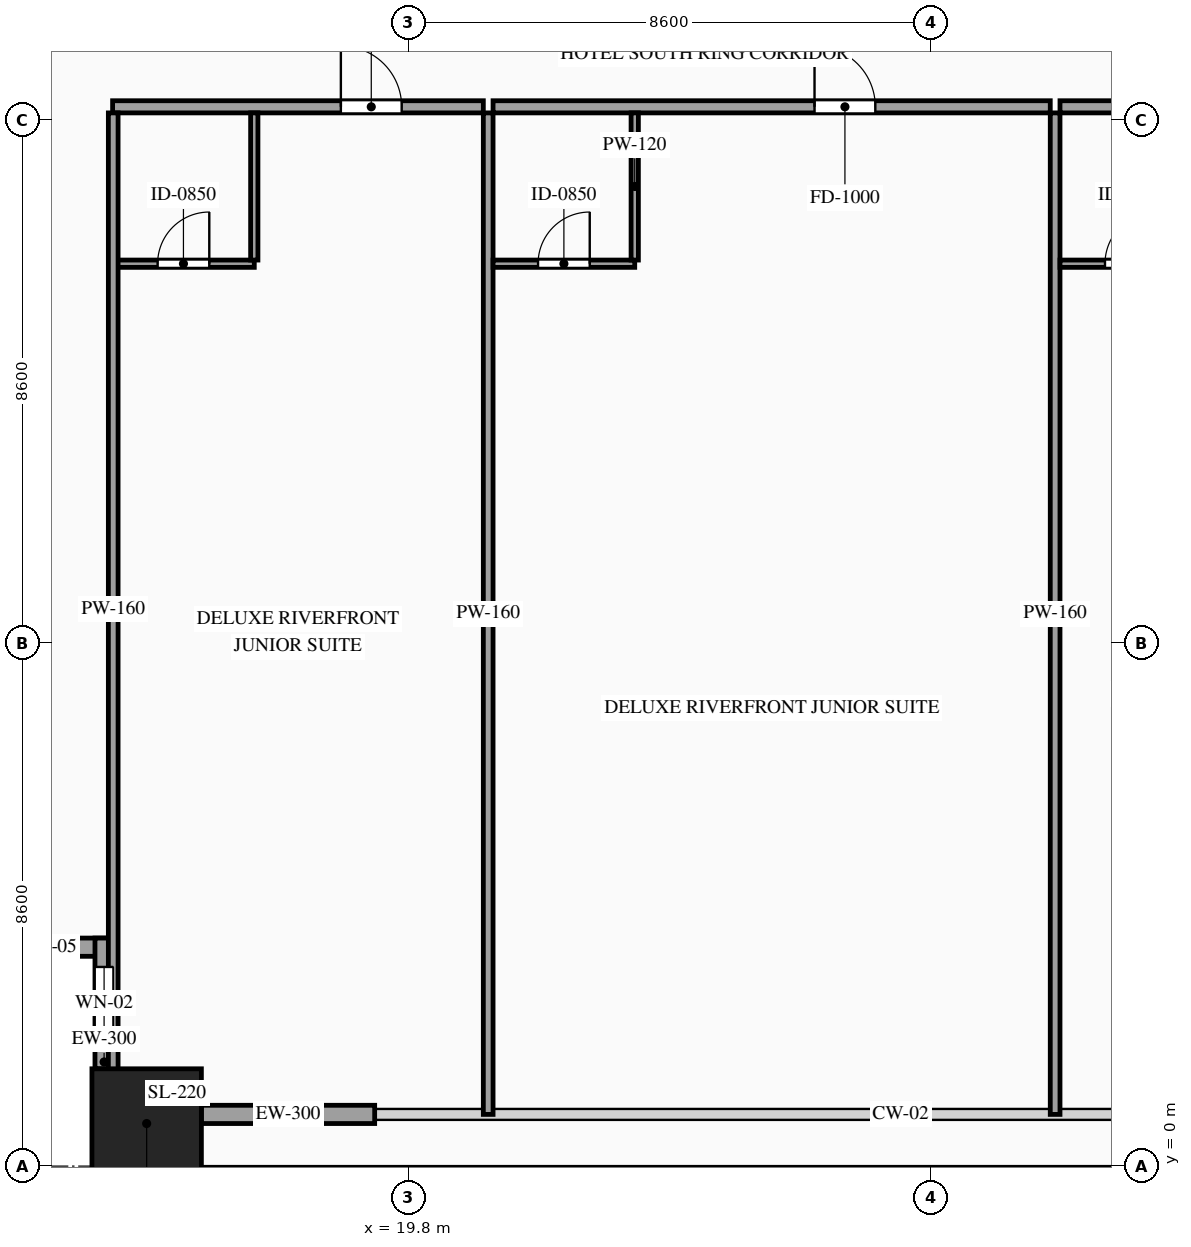
"""IFC4 building model, lengths in metres.
Left out: names, types, materials, properties, quantities, classifications, styles, units other than length and angle.
Written with IfcOpenShell. Run it as: python <this file> out.ifc"""

import sys

from ifc_helpers import new_model, si_unit, direction, frame, frame_2d, origin, origin_2d, place, context, subcontext, project, spatial, rectangle, hollow_rectangle, extrude, source, transform, mapped, element, fill, save


model = new_model("IFC4")
c1 = context("Model", 3, precision=1e-05, world=origin(), true_north=direction((0.0, 1.0)))
c2 = subcontext(c1, "Body", "Model", "MODEL_VIEW")
j1 = project(units=[si_unit("LENGTHUNIT", "METRE"), si_unit("PLANEANGLEUNIT", "RADIAN")], contexts=[c1])
p1 = place(None, origin())
s1 = spatial("IfcSite", under=j1, at=p1, CompositionType="ELEMENT")
p2 = place(p1, origin())
s2 = spatial("IfcBuilding", under=s1, at=p2, CompositionType="ELEMENT")
p3 = place(p2, frame((0.0, 0.0, 64.0)))
s3 = spatial("IfcBuildingStorey", under=s2, at=p3, CompositionType="ELEMENT", Elevation=64.0)
m1 = source(origin(), c2, "Body", "SweptSolid", [
    extrude(hollow_rectangle(XDim=1.8, YDim=1.8, WallThickness=0.08, at=origin_2d()), origin(), (0.0, 0.0, 1.0), 3.6),
])
p4 = place(p3, frame((15.5, 0.7, 0.0), z_axis=(0.0, 0.0, 1.0), x_axis=(1.0, 0.0, 0.0)))
e1 = element("IfcColumn", 1, at=p4, inside=s3, PredefinedType="COLUMN", context=c2, shape_type="MappedRepresentation", body=[
    mapped(m1, transform((0.0, 0.0, 0.0), scale=1.0)),
])
p5 = place(p3, frame((12.8, 3.6, 0.0), z_axis=(0.0, 0.0, 1.0), x_axis=(1.0, 0.0, 0.0)))
e2 = element("IfcWall", 2, at=p5, inside=s3, PredefinedType="SOLIDWALL", context=c2, shape_type="SweptSolid", body=[
    extrude(rectangle(XDim=2.15, YDim=0.3, at=frame_2d((1.075, 0.0))), origin(), (0.0, 0.0, 1.0), 3.38),
])
p6 = place(p5, frame((0.625, 0.0, 0.85)))
e3 = element("IfcOpeningElement", 3, at=p6, cuts=e2, PredefinedType="OPENING", context=c2, shape_type="SweptSolid", body=[
    extrude(rectangle(XDim=0.9, YDim=1.5, at=frame_2d((0.45, 0.75))), frame((0.0, 0.165, 0.0), z_axis=(0.0, -1.0, 0.0), x_axis=(1.0, 0.0, 0.0)), (0.0, 0.0, 1.0), 0.33),
])
p7 = place(p3, frame((14.8, 3.75, 0.0), z_axis=(0.0, 0.0, 1.0), x_axis=(0.0, -1.0, 0.0)))
e4 = element("IfcWall", 4, at=p7, inside=s3, PredefinedType="SOLIDWALL", context=c2, shape_type="SweptSolid", body=[
    extrude(rectangle(XDim=2.15, YDim=0.3, at=frame_2d((1.075, 0.0))), origin(), (0.0, 0.0, 1.0), 3.38),
])
p8 = place(p7, frame((0.475, 0.0, 0.85)))
e5 = element("IfcOpeningElement", 5, at=p8, cuts=e4, PredefinedType="OPENING", context=c2, shape_type="SweptSolid", body=[
    extrude(rectangle(XDim=1.2, YDim=2.1, at=frame_2d((0.6, 1.05))), frame((0.0, 0.165, 0.0), z_axis=(0.0, -1.0, 0.0), x_axis=(1.0, 0.0, 0.0)), (0.0, 0.0, 1.0), 0.33),
])
m2 = source(origin(), c2, "Body", "SweptSolid", [
    extrude(rectangle(XDim=2.85, YDim=0.3, at=frame_2d((1.425, 0.0))), origin(), (0.0, 0.0, 1.0), 2.775),
])
p9 = place(p3, frame((16.4, 0.85, 0.0), z_axis=(0.0, 0.0, 1.0), x_axis=(1.0, 0.0, 0.0)))
e6 = element("IfcWall", 6, at=p9, inside=s3, PredefinedType="SOLIDWALL", context=c2, shape_type="MappedRepresentation", body=[
    mapped(m2, transform((0.0, 0.0, 0.0), scale=1.0)),
])
p10 = place(p3, frame((14.94, 17.42, 0.0), z_axis=(0.0, 0.0, 1.0), x_axis=(1.0, 0.0, 0.0)))
e7 = element("IfcWall", 7, at=p10, inside=s3, PredefinedType="PARTITIONING", context=c2, shape_type="SweptSolid", body=[
    extrude(rectangle(XDim=6.097, YDim=0.2, at=frame_2d((3.049, 0.0))), origin(), (0.0, 0.0, 1.0), 3.38),
])
p11 = place(p10, frame((3.754, 0.0, 0.0)))
e8 = element("IfcOpeningElement", 8, at=p11, cuts=e7, PredefinedType="OPENING", context=c2, shape_type="SweptSolid", body=[
    extrude(rectangle(XDim=1.0, YDim=2.2, at=frame_2d((0.5, 1.1))), frame((0.0, 0.115, 0.0), z_axis=(0.0, -1.0, 0.0), x_axis=(1.0, 0.0, 0.0)), (0.0, 0.0, 1.0), 0.23),
])
m3 = source(origin(), c2, "Body", "SweptSolid", [
    extrude(rectangle(XDim=16.47, YDim=0.16, at=frame_2d((8.235, 0.0))), origin(), (0.0, 0.0, 1.0), 3.38),
])
p12 = place(p3, frame((21.117, 0.85, 0.0), z_axis=(0.0, 0.0, 1.0), x_axis=(0.0, 1.0, 0.0)))
e9 = element("IfcWall", 9, at=p12, inside=s3, PredefinedType="PARTITIONING", context=c2, shape_type="MappedRepresentation", body=[
    mapped(m3, transform((0.0, 0.0, 0.0), scale=1.0)),
])
p13 = place(p3, frame((14.94, 14.84, 0.0), z_axis=(0.0, 0.0, 1.0), x_axis=(1.0, 0.0, 0.0)))
e10 = element("IfcWall", 10, at=p13, inside=s3, PredefinedType="PARTITIONING", context=c2, shape_type="SweptSolid", body=[
    extrude(rectangle(XDim=2.33, YDim=0.12, at=frame_2d((1.165, 0.0))), origin(), (0.0, 0.0, 1.0), 3.38),
])
p14 = place(p13, frame((0.74, 0.0, 0.0)))
e11 = element("IfcOpeningElement", 11, at=p14, cuts=e10, PredefinedType="OPENING", context=c2, shape_type="SweptSolid", body=[
    extrude(rectangle(XDim=0.85, YDim=2.1, at=frame_2d((0.425, 1.05))), frame((0.0, 0.075, 0.0), z_axis=(0.0, -1.0, 0.0), x_axis=(1.0, 0.0, 0.0)), (0.0, 0.0, 1.0), 0.15),
])
m4 = source(origin(), c2, "Body", "SweptSolid", [
    extrude(rectangle(XDim=2.42, YDim=0.12, at=frame_2d((1.21, 0.0))), origin(), (0.0, 0.0, 1.0), 3.38),
])
p15 = place(p3, frame((17.27, 14.9, 0.0), z_axis=(0.0, 0.0, 1.0), x_axis=(0.0, 1.0, 0.0)))
e12 = element("IfcWall", 12, at=p15, inside=s3, PredefinedType="PARTITIONING", context=c2, shape_type="MappedRepresentation", body=[
    mapped(m4, transform((0.0, 0.0, 0.0), scale=1.0)),
])
p16 = place(p3, frame((21.197, 17.42, 0.0), z_axis=(0.0, 0.0, 1.0), x_axis=(1.0, 0.0, 0.0)))
e13 = element("IfcWall", 13, at=p16, inside=s3, PredefinedType="PARTITIONING", context=c2, shape_type="SweptSolid", body=[
    extrude(rectangle(XDim=9.164, YDim=0.2, at=frame_2d((4.582, 0.0))), origin(), (0.0, 0.0, 1.0), 3.38),
])
p17 = place(p16, frame((5.287, 0.0, 0.0)))
e14 = element("IfcOpeningElement", 14, at=p17, cuts=e13, PredefinedType="OPENING", context=c2, shape_type="SweptSolid", body=[
    extrude(rectangle(XDim=1.0, YDim=2.2, at=frame_2d((0.5, 1.1))), frame((0.0, 0.115, 0.0), z_axis=(0.0, -1.0, 0.0), x_axis=(1.0, 0.0, 0.0)), (0.0, 0.0, 1.0), 0.23),
])
p18 = place(p3, frame((30.441, 0.85, 0.0), z_axis=(0.0, 0.0, 1.0), x_axis=(0.0, 1.0, 0.0)))
e15 = element("IfcWall", 15, at=p18, inside=s3, PredefinedType="PARTITIONING", context=c2, shape_type="MappedRepresentation", body=[
    mapped(m3, transform((0.0, 0.0, 0.0), scale=1.0)),
])
p19 = place(p3, frame((21.197, 14.84, 0.0), z_axis=(0.0, 0.0, 1.0), x_axis=(1.0, 0.0, 0.0)))
e16 = element("IfcWall", 16, at=p19, inside=s3, PredefinedType="PARTITIONING", context=c2, shape_type="SweptSolid", body=[
    extrude(rectangle(XDim=2.33, YDim=0.12, at=frame_2d((1.165, 0.0))), origin(), (0.0, 0.0, 1.0), 3.38),
])
p20 = place(p19, frame((0.74, 0.0, 0.0)))
e17 = element("IfcOpeningElement", 17, at=p20, cuts=e16, PredefinedType="OPENING", context=c2, shape_type="SweptSolid", body=[
    extrude(rectangle(XDim=0.85, YDim=2.1, at=frame_2d((0.425, 1.05))), frame((0.0, 0.075, 0.0), z_axis=(0.0, -1.0, 0.0), x_axis=(1.0, 0.0, 0.0)), (0.0, 0.0, 1.0), 0.15),
])
p21 = place(p3, frame((23.527, 14.9, 0.0), z_axis=(0.0, 0.0, 1.0), x_axis=(0.0, 1.0, 0.0)))
e18 = element("IfcWall", 18, at=p21, inside=s3, PredefinedType="PARTITIONING", context=c2, shape_type="MappedRepresentation", body=[
    mapped(m4, transform((0.0, 0.0, 0.0), scale=1.0)),
])
p22 = place(p3, frame((30.521, 17.42, 0.0), z_axis=(0.0, 0.0, 1.0), x_axis=(1.0, 0.0, 0.0)))
e19 = element("IfcWall", 19, at=p22, inside=s3, PredefinedType="PARTITIONING", context=c2, shape_type="SweptSolid", body=[
    extrude(rectangle(XDim=5.075, YDim=0.2, at=frame_2d((2.538, 0.0))), origin(), (0.0, 0.0, 1.0), 3.38),
])
p23 = place(p22, frame((3.242, 0.0, 0.0)))
e20 = element("IfcOpeningElement", 20, at=p23, cuts=e19, PredefinedType="OPENING", context=c2, shape_type="SweptSolid", body=[
    extrude(rectangle(XDim=1.0, YDim=2.2, at=frame_2d((0.5, 1.1))), frame((0.0, 0.115, 0.0), z_axis=(0.0, -1.0, 0.0), x_axis=(1.0, 0.0, 0.0)), (0.0, 0.0, 1.0), 0.23),
])
p24 = place(p3, frame((30.521, 14.84, 0.0), z_axis=(0.0, 0.0, 1.0), x_axis=(1.0, 0.0, 0.0)))
e21 = element("IfcWall", 21, at=p24, inside=s3, PredefinedType="PARTITIONING", context=c2, shape_type="SweptSolid", body=[
    extrude(rectangle(XDim=2.33, YDim=0.12, at=frame_2d((1.165, 0.0))), origin(), (0.0, 0.0, 1.0), 3.38),
])
p25 = place(p24, frame((0.74, 0.0, 0.0)))
e22 = element("IfcOpeningElement", 22, at=p25, cuts=e21, PredefinedType="OPENING", context=c2, shape_type="SweptSolid", body=[
    extrude(rectangle(XDim=0.85, YDim=2.1, at=frame_2d((0.425, 1.05))), frame((0.0, 0.075, 0.0), z_axis=(0.0, -1.0, 0.0), x_axis=(1.0, 0.0, 0.0)), (0.0, 0.0, 1.0), 0.15),
])
m5 = source(origin(), c2, "Body", "SweptSolid", [
    extrude(rectangle(XDim=16.32, YDim=0.16, at=frame_2d((8.16, 0.0))), origin(), (0.0, 0.0, 1.0), 3.38),
])
p26 = place(p3, frame((14.95, 1.0, 0.0), z_axis=(0.0, 0.0, 1.0), x_axis=(0.0, 1.0, 0.0)))
e23 = element("IfcWall", 23, at=p26, inside=s3, PredefinedType="PARTITIONING", context=c2, shape_type="MappedRepresentation", body=[
    mapped(m5, transform((0.0, 0.0, 0.0), scale=1.0)),
])
m6 = source(origin(), c2, "Body", "SweptSolid", [
    extrude(rectangle(XDim=0.9, YDim=1.5, at=frame_2d((0.45, 0.75))), frame((0.0, 0.03, 0.0), z_axis=(0.0, -1.0, 0.0), x_axis=(1.0, 0.0, 0.0)), (0.0, 0.0, 1.0), 0.06),
])
p27 = place(p6, origin())
e24 = element("IfcWindow", 24, at=p27, inside=s3, PartitioningType="SINGLE_PANEL", PredefinedType="WINDOW", context=c2, shape_type="MappedRepresentation", body=[
    mapped(m6, transform((0.0, 0.0, 0.0), scale=1.0)),
])
fill(e3, e24)
m7 = source(origin(), c2, "Body", "SweptSolid", [
    extrude(rectangle(XDim=1.2, YDim=2.1, at=frame_2d((0.6, 1.05))), frame((0.0, 0.03, 0.0), z_axis=(0.0, -1.0, 0.0), x_axis=(1.0, 0.0, 0.0)), (0.0, 0.0, 1.0), 0.06),
])
p28 = place(p8, origin())
e25 = element("IfcWindow", 25, at=p28, inside=s3, PartitioningType="SINGLE_PANEL", PredefinedType="WINDOW", context=c2, shape_type="MappedRepresentation", body=[
    mapped(m7, transform((0.0, 0.0, 0.0), scale=1.0)),
])
fill(e5, e25)
m8 = source(origin(), c2, "Body", "SweptSolid", [
    extrude(rectangle(XDim=1.0, YDim=2.2, at=frame_2d((0.5, 1.1))), frame((0.0, 0.025, 0.0), z_axis=(0.0, -1.0, 0.0), x_axis=(1.0, 0.0, 0.0)), (0.0, 0.0, 1.0), 0.05),
])
p29 = place(p11, origin())
e26 = element("IfcDoor", 26, at=p29, inside=s3, OperationType="SINGLE_SWING_LEFT", PredefinedType="DOOR", context=c2, shape_type="MappedRepresentation", body=[
    mapped(m8, transform((0.0, 0.0, 0.0), scale=1.0)),
])
fill(e8, e26)
m9 = source(origin(), c2, "Body", "SweptSolid", [
    extrude(rectangle(XDim=0.85, YDim=2.1, at=frame_2d((0.425, 1.05))), frame((0.0, 0.025, 0.0), z_axis=(0.0, -1.0, 0.0), x_axis=(1.0, 0.0, 0.0)), (0.0, 0.0, 1.0), 0.05),
])
p30 = place(p14, origin())
e27 = element("IfcDoor", 27, at=p30, inside=s3, OperationType="SINGLE_SWING_RIGHT", PredefinedType="DOOR", context=c2, shape_type="MappedRepresentation", body=[
    mapped(m9, transform((0.0, 0.0, 0.0), scale=1.0)),
])
fill(e11, e27)
p31 = place(p17, origin())
e28 = element("IfcDoor", 28, at=p31, inside=s3, OperationType="SINGLE_SWING_LEFT", PredefinedType="DOOR", context=c2, shape_type="MappedRepresentation", body=[
    mapped(m8, transform((0.0, 0.0, 0.0), scale=1.0)),
])
fill(e14, e28)
p32 = place(p20, origin())
e29 = element("IfcDoor", 29, at=p32, inside=s3, OperationType="SINGLE_SWING_RIGHT", PredefinedType="DOOR", context=c2, shape_type="MappedRepresentation", body=[
    mapped(m9, transform((0.0, 0.0, 0.0), scale=1.0)),
])
fill(e17, e29)
p33 = place(p25, origin())
e30 = element("IfcDoor", 30, at=p33, inside=s3, OperationType="SINGLE_SWING_RIGHT", PredefinedType="DOOR", context=c2, shape_type="MappedRepresentation", body=[
    mapped(m9, transform((0.0, 0.0, 0.0), scale=1.0)),
])
fill(e22, e30)
save(model, sys.argv[1])
